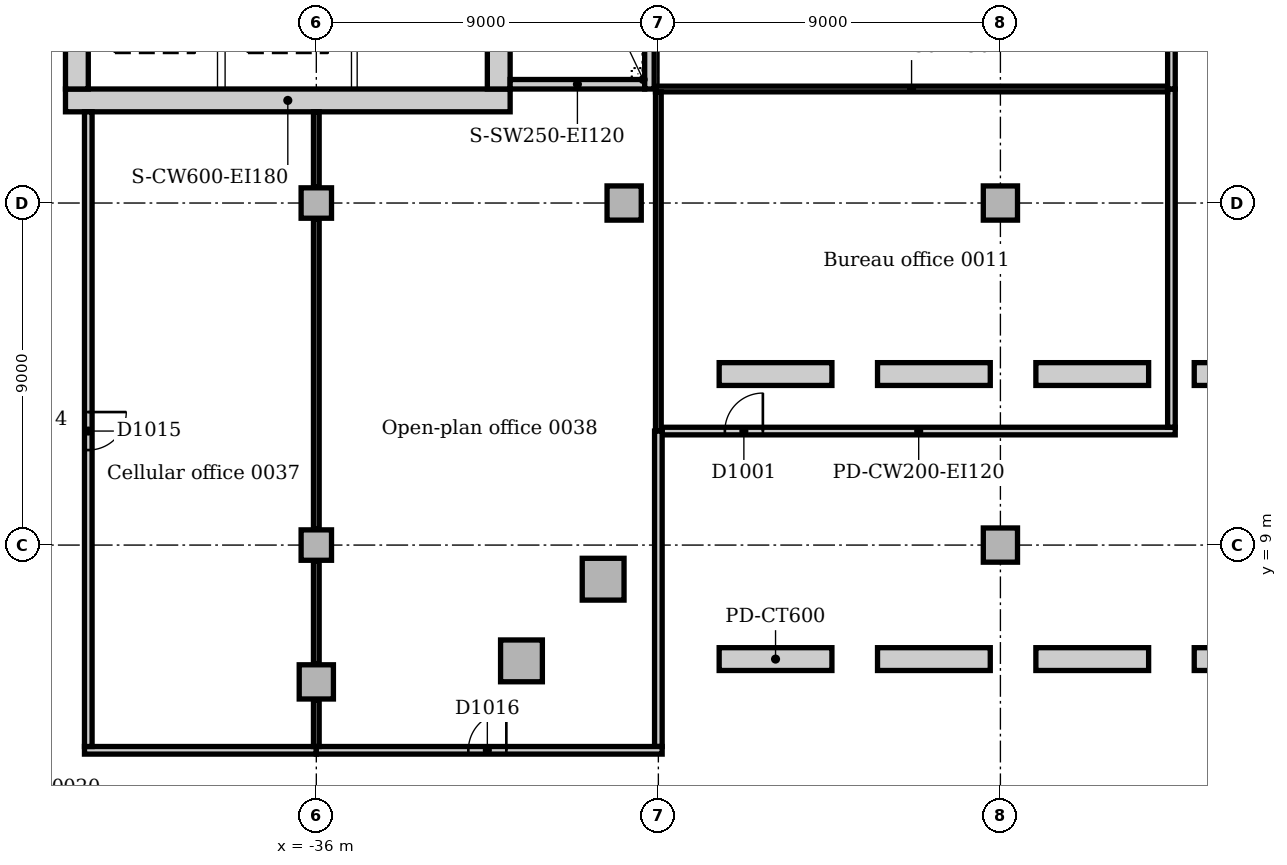
"""IFC4 building model, lengths in metres.
Left out: names, types, materials, properties, quantities, classifications, styles, units other than length and angle.
Written with IfcOpenShell. Run it as: python <this file> out.ifc"""

import sys

from ifc_helpers import new_model, si_unit, direction, frame, frame_2d, origin, origin_2d, place, context, subcontext, project, spatial, rectangle, extrude, element, fill, save


model = new_model("IFC4")
c1 = context("Model", 3, precision=1e-05, world=origin(), true_north=direction((0.0, 1.0)))
c2 = subcontext(c1, "Body", "Model", "MODEL_VIEW")
j1 = project(units=[si_unit("LENGTHUNIT", "METRE"), si_unit("PLANEANGLEUNIT", "RADIAN")], contexts=[c1])
p1 = place(None, origin())
s1 = spatial("IfcSite", under=j1, at=p1, CompositionType="ELEMENT")
p2 = place(p1, origin())
s2 = spatial("IfcBuilding", under=s1, at=p2, CompositionType="ELEMENT")
p3 = place(p2, origin())
s3 = spatial("IfcBuildingStorey", under=s2, at=p3, CompositionType="ELEMENT", Elevation=0.0)
p4 = place(p3, frame((-42.6, 20.7, 0.0), z_axis=(0.0, 0.0, 1.0), x_axis=(1.0, 0.0, 0.0)))
e1 = element("IfcWall", 1, at=p4, inside=s3, PredefinedType="SOLIDWALL", context=c2, shape_type="SweptSolid", body=[
    extrude(rectangle(XDim=11.7, YDim=0.6, at=frame_2d((5.85, 0.0))), origin(), (0.0, 0.0, 1.0), 6.0),
])
p5 = place(p3, frame((-31.2, 21.0, 0.0), z_axis=(0.0, 0.0, 1.0), x_axis=(0.0, 1.0, 0.0)))
e2 = element("IfcWall", 2, at=p5, inside=s3, PredefinedType="SOLIDWALL", context=c2, shape_type="SweptSolid", body=[
    extrude(rectangle(XDim=9.5, YDim=0.6, at=frame_2d((4.75, 0.0))), origin(), (0.0, 0.0, 1.0), 6.0),
])
p6 = place(p5, frame((5.25, 0.0, 0.0)))
e3 = element("IfcOpeningElement", 3, at=p6, cuts=e2, PredefinedType="OPENING", context=c2, shape_type="SweptSolid", body=[
    extrude(rectangle(XDim=1.0, YDim=2.1, at=frame_2d((0.5, 1.05))), frame((0.0, 0.31, 0.0), z_axis=(0.0, -1.0, 0.0), x_axis=(1.0, 0.0, 0.0)), (0.0, 0.0, 1.0), 0.62),
])
p7 = place(p3, frame((-42.3, 30.5, 0.0), z_axis=(0.0, 0.0, 1.0), x_axis=(0.0, -1.0, 0.0)))
e4 = element("IfcWall", 4, at=p7, inside=s3, PredefinedType="SOLIDWALL", context=c2, shape_type="SweptSolid", body=[
    extrude(rectangle(XDim=9.5, YDim=0.6, at=frame_2d((4.75, 0.0))), origin(), (0.0, 0.0, 1.0), 6.0),
])
p8 = place(p7, frame((3.85, 0.0, 0.0)))
e5 = element("IfcOpeningElement", 5, at=p8, cuts=e4, PredefinedType="OPENING", context=c2, shape_type="SweptSolid", body=[
    extrude(rectangle(XDim=1.8, YDim=2.1, at=frame_2d((0.9, 1.05))), frame((0.0, 0.31, 0.0), z_axis=(0.0, -1.0, 0.0), x_axis=(1.0, 0.0, 0.0)), (0.0, 0.0, 1.0), 0.62),
])
p9 = place(p3, frame((-30.9, 21.125, 0.0), z_axis=(0.0, 0.0, 1.0), x_axis=(1.0, 0.0, 0.0)))
e6 = element("IfcWall", 6, at=p9, inside=s3, PredefinedType="SOLIDWALL", context=c2, shape_type="SweptSolid", body=[
    extrude(rectangle(XDim=3.54, YDim=0.25, at=frame_2d((1.77, 0.0))), origin(), (0.0, 0.0, 1.0), 6.0),
])
p10 = place(p3, frame((-27.235, 21.0, 0.0), z_axis=(0.0, 0.0, 1.0), x_axis=(0.0, 1.0, 0.0)))
e7 = element("IfcWall", 7, at=p10, inside=s3, PredefinedType="SOLIDWALL", context=c2, shape_type="SweptSolid", body=[
    extrude(rectangle(XDim=6.65, YDim=0.25, at=frame_2d((3.325, 0.0))), origin(), (0.0, 0.0, 1.0), 6.0),
])
for number, where, z_axis, x_axis in (
    (8, (-30.602, 5.953, 0.0), (0.0, 0.0, 1.0), (1.0, 0.0, 0.0)),
    (9, (-28.453, 8.102, 0.0), (0.0, 0.0, 1.0), (1.0, 0.0, 0.0)),
):
    element("IfcColumn", number, at=place(p3, frame(where, z_axis=z_axis, x_axis=x_axis)), inside=s3, PredefinedType="COLUMN", context=c2, shape_type="SweptSolid", body=[
        extrude(rectangle(XDim=1.1, YDim=1.1, at=origin_2d()), origin(), (0.0, 0.0, 1.0), 5.7),
    ])
for number, where, z_axis, x_axis in (
    (10, (-36.0, 5.4, 0.0), (0.0, 0.0, 1.0), (1.0, 0.0, 0.0)),
    (11, (-27.9, 18.0, 0.0), (0.0, 0.0, 1.0), (1.0, 0.0, 0.0)),
):
    element("IfcColumn", number, at=place(p3, frame(where, z_axis=z_axis, x_axis=x_axis)), inside=s3, PredefinedType="COLUMN", context=c2, shape_type="SweptSolid", body=[
        extrude(rectangle(XDim=0.9, YDim=0.9, at=origin_2d()), origin(), (0.0, 0.0, 1.0), 5.7),
    ])
for number, where, z_axis, x_axis in (
    (12, (-36.0, 9.0, 0.0), (0.0, 0.0, 1.0), (1.0, 0.0, 0.0)),
    (13, (-36.0, 18.0, 0.0), (0.0, 0.0, 1.0), (1.0, 0.0, 0.0)),
):
    element("IfcColumn", number, at=place(p3, frame(where, z_axis=z_axis, x_axis=x_axis)), inside=s3, PredefinedType="COLUMN", context=c2, shape_type="SweptSolid", body=[
        extrude(rectangle(XDim=0.8, YDim=0.8, at=origin_2d()), origin(), (0.0, 0.0, 1.0), 5.7),
    ])
for number, where, z_axis, x_axis in (
    (14, (-18.0, 9.0, 0.0), (0.0, 0.0, 1.0), (1.0, 0.0, 0.0)),
    (15, (-18.0, 18.0, 0.0), (0.0, 0.0, 1.0), (1.0, 0.0, 0.0)),
):
    element("IfcColumn", number, at=place(p3, frame(where, z_axis=z_axis, x_axis=x_axis)), inside=s3, PredefinedType="COLUMN", context=c2, shape_type="SweptSolid", body=[
        extrude(rectangle(XDim=0.9, YDim=0.9, at=origin_2d()), origin(), (0.0, 0.0, 1.0), 5.7),
    ])
p11 = place(p3, frame((-26.9, 12.0, 0.0), z_axis=(0.0, 0.0, 1.0), x_axis=(1.0, 0.0, 0.0)))
e16 = element("IfcWall", 16, at=p11, inside=s3, PredefinedType="PARTITIONING", context=c2, shape_type="SweptSolid", body=[
    extrude(rectangle(XDim=13.5, YDim=0.2, at=frame_2d((6.75, 0.0))), origin(), (0.0, 0.0, 1.0), 5.7),
])
p12 = place(p11, frame((1.65, 0.0, 0.0)))
e17 = element("IfcOpeningElement", 17, at=p12, cuts=e16, PredefinedType="OPENING", context=c2, shape_type="SweptSolid", body=[
    extrude(rectangle(XDim=1.0, YDim=2.1, at=frame_2d((0.5, 1.05))), frame((0.0, 0.11, 0.0), z_axis=(0.0, -1.0, 0.0), x_axis=(1.0, 0.0, 0.0)), (0.0, 0.0, 1.0), 0.22),
])
p13 = place(p3, frame((-13.5, 12.1, 0.0), z_axis=(0.0, 0.0, 1.0), x_axis=(0.0, 1.0, 0.0)))
e18 = element("IfcWall", 18, at=p13, inside=s3, PredefinedType="PARTITIONING", context=c2, shape_type="SweptSolid", body=[
    extrude(rectangle(XDim=8.9, YDim=0.2, at=frame_2d((4.45, 0.0))), origin(), (0.0, 0.0, 1.0), 5.7),
])
p14 = place(p3, frame((-27.075, 21.0, 0.0), z_axis=(0.0, 0.0, 1.0), x_axis=(1.0, 0.0, 0.0)))
e19 = element("IfcWall", 19, at=p14, inside=s3, PredefinedType="PARTITIONING", context=c2, shape_type="SweptSolid", body=[
    extrude(rectangle(XDim=13.475, YDim=0.15, at=frame_2d((6.737, 0.0))), origin(), (0.0, 0.0, 1.0), 5.7),
])
p15 = place(p3, frame((-27.0, 12.0, 0.0), z_axis=(0.0, 0.0, 1.0), x_axis=(0.0, 1.0, 0.0)))
e20 = element("IfcWall", 20, at=p15, inside=s3, PredefinedType="PARTITIONING", context=c2, shape_type="SweptSolid", body=[
    extrude(rectangle(XDim=8.925, YDim=0.15, at=frame_2d((4.463, 0.0))), origin(), (0.0, 0.0, 1.0), 5.7),
])
p16 = place(p3, frame((-27.0, 3.7, 0.0), z_axis=(0.0, 0.0, 1.0), x_axis=(0.0, 1.0, 0.0)))
e21 = element("IfcWall", 21, at=p16, inside=s3, PredefinedType="PARTITIONING", context=c2, shape_type="SweptSolid", body=[
    extrude(rectangle(XDim=8.3, YDim=0.2, at=frame_2d((4.15, 0.0))), origin(), (0.0, 0.0, 1.0), 5.7),
])
p17 = place(p3, frame((-13.5, 21.0, 0.0), z_axis=(0.0, 0.0, 1.0), x_axis=(0.0, 1.0, 0.0)))
e22 = element("IfcWall", 22, at=p17, inside=s3, PredefinedType="PARTITIONING", context=c2, shape_type="SweptSolid", body=[
    extrude(rectangle(XDim=10.0, YDim=0.2, at=frame_2d((5.0, 0.0))), origin(), (0.0, 0.0, 1.0), 5.7),
])
p18 = place(p17, frame((5.5, 0.0, 0.0)))
e23 = element("IfcOpeningElement", 23, at=p18, cuts=e22, PredefinedType="OPENING", context=c2, shape_type="SweptSolid", body=[
    extrude(rectangle(XDim=1.0, YDim=2.1, at=frame_2d((0.5, 1.05))), frame((0.0, 0.11, 0.0), z_axis=(0.0, -1.0, 0.0), x_axis=(1.0, 0.0, 0.0)), (0.0, 0.0, 1.0), 0.22),
])
p19 = place(p3, frame((-42.1, 3.6, 0.0), z_axis=(0.0, 0.0, 1.0), x_axis=(1.0, 0.0, 0.0)))
e24 = element("IfcWall", 24, at=p19, inside=s3, PredefinedType="PARTITIONING", context=c2, shape_type="SweptSolid", body=[
    extrude(rectangle(XDim=6.1, YDim=0.2, at=frame_2d((3.05, 0.0))), origin(), (0.0, 0.0, 1.0), 5.7),
])
p20 = place(p3, frame((-36.0, 3.6, 0.0), z_axis=(0.0, 0.0, 1.0), x_axis=(1.0, 0.0, 0.0)))
e25 = element("IfcWall", 25, at=p20, inside=s3, PredefinedType="PARTITIONING", context=c2, shape_type="SweptSolid", body=[
    extrude(rectangle(XDim=9.1, YDim=0.2, at=frame_2d((4.55, 0.0))), origin(), (0.0, 0.0, 1.0), 5.7),
])
p21 = place(p20, frame((4.0, 0.0, 0.0)))
e26 = element("IfcOpeningElement", 26, at=p21, cuts=e25, PredefinedType="OPENING", context=c2, shape_type="SweptSolid", body=[
    extrude(rectangle(XDim=1.0, YDim=2.1, at=frame_2d((0.5, 1.05))), frame((0.0, 0.11, 0.0), z_axis=(0.0, -1.0, 0.0), x_axis=(1.0, 0.0, 0.0)), (0.0, 0.0, 1.0), 0.22),
])
p22 = place(p3, frame((-42.0, 3.7, 0.0), z_axis=(0.0, 0.0, 1.0), x_axis=(0.0, 1.0, 0.0)))
e27 = element("IfcWall", 27, at=p22, inside=s3, PredefinedType="PARTITIONING", context=c2, shape_type="SweptSolid", body=[
    extrude(rectangle(XDim=16.7, YDim=0.2, at=frame_2d((8.35, 0.0))), origin(), (0.0, 0.0, 1.0), 5.7),
])
p23 = place(p22, frame((7.8, 0.0, 0.0)))
e28 = element("IfcOpeningElement", 28, at=p23, cuts=e27, PredefinedType="OPENING", context=c2, shape_type="SweptSolid", body=[
    extrude(rectangle(XDim=1.0, YDim=2.1, at=frame_2d((0.5, 1.05))), frame((0.0, 0.11, 0.0), z_axis=(0.0, -1.0, 0.0), x_axis=(1.0, 0.0, 0.0)), (0.0, 0.0, 1.0), 0.22),
])
p24 = place(p3, frame((-36.0, 3.7, 0.0), z_axis=(0.0, 0.0, 1.0), x_axis=(0.0, 1.0, 0.0)))
e29 = element("IfcWall", 29, at=p24, inside=s3, PredefinedType="PARTITIONING", context=c2, shape_type="SweptSolid", body=[
    extrude(rectangle(XDim=1.23, YDim=0.15, at=frame_2d((0.615, 0.0))), origin(), (0.0, 0.0, 1.0), 5.7),
])
p25 = place(p3, frame((-36.0, 5.87, 0.0), z_axis=(0.0, 0.0, 1.0), x_axis=(0.0, 1.0, 0.0)))
e30 = element("IfcWall", 30, at=p25, inside=s3, PredefinedType="PARTITIONING", context=c2, shape_type="SweptSolid", body=[
    extrude(rectangle(XDim=2.71, YDim=0.15, at=frame_2d((1.355, 0.0))), origin(), (0.0, 0.0, 1.0), 5.7),
])
p26 = place(p3, frame((-36.0, 9.42, 0.0), z_axis=(0.0, 0.0, 1.0), x_axis=(0.0, 1.0, 0.0)))
e31 = element("IfcWall", 31, at=p26, inside=s3, PredefinedType="PARTITIONING", context=c2, shape_type="SweptSolid", body=[
    extrude(rectangle(XDim=8.16, YDim=0.15, at=frame_2d((4.08, 0.0))), origin(), (0.0, 0.0, 1.0), 5.7),
])
p27 = place(p3, frame((-36.0, 18.42, 0.0), z_axis=(0.0, 0.0, 1.0), x_axis=(0.0, 1.0, 0.0)))
e32 = element("IfcWall", 32, at=p27, inside=s3, PredefinedType="PARTITIONING", context=c2, shape_type="SweptSolid", body=[
    extrude(rectangle(XDim=1.98, YDim=0.15, at=frame_2d((0.99, 0.0))), origin(), (0.0, 0.0, 1.0), 5.7),
])
p28 = place(p3, frame((-25.4, 6.0, 0.0), z_axis=(0.0, 0.0, 1.0), x_axis=(1.0, 0.0, 0.0)))
e33 = element("IfcWall", 33, at=p28, inside=s3, PredefinedType="MOVABLE", context=c2, shape_type="SweptSolid", body=[
    extrude(rectangle(XDim=2.967, YDim=0.6, at=frame_2d((1.483, 0.0))), origin(), (0.0, 0.0, 1.0), 1.1),
])
p29 = place(p3, frame((-21.233, 6.0, 0.0), z_axis=(0.0, 0.0, 1.0), x_axis=(1.0, 0.0, 0.0)))
e34 = element("IfcWall", 34, at=p29, inside=s3, PredefinedType="MOVABLE", context=c2, shape_type="SweptSolid", body=[
    extrude(rectangle(XDim=2.967, YDim=0.6, at=frame_2d((1.483, 0.0))), origin(), (0.0, 0.0, 1.0), 1.1),
])
for number, where, z_axis, x_axis in (
    (35, (-17.067, 6.0, 0.0), (0.0, 0.0, 1.0), (1.0, 0.0, 0.0)),
    (36, (-12.9, 6.0, 0.0), (0.0, 0.0, 1.0), (1.0, 0.0, 0.0)),
    (37, (-25.4, 13.5, 0.0), (0.0, 0.0, 1.0), (1.0, 0.0, 0.0)),
):
    element("IfcWall", number, at=place(p3, frame(where, z_axis=z_axis, x_axis=x_axis)), inside=s3, PredefinedType="MOVABLE", context=c2, shape_type="SweptSolid", body=[
        extrude(rectangle(XDim=2.967, YDim=0.6, at=frame_2d((1.483, 0.0))), origin(), (0.0, 0.0, 1.0), 1.1),
    ])
p30 = place(p3, frame((-21.233, 13.5, 0.0), z_axis=(0.0, 0.0, 1.0), x_axis=(1.0, 0.0, 0.0)))
e38 = element("IfcWall", 38, at=p30, inside=s3, PredefinedType="MOVABLE", context=c2, shape_type="SweptSolid", body=[
    extrude(rectangle(XDim=2.967, YDim=0.6, at=frame_2d((1.483, 0.0))), origin(), (0.0, 0.0, 1.0), 1.1),
])
for number, where, z_axis, x_axis in (
    (39, (-17.067, 13.5, 0.0), (0.0, 0.0, 1.0), (1.0, 0.0, 0.0)),
    (40, (-12.9, 13.5, 0.0), (0.0, 0.0, 1.0), (1.0, 0.0, 0.0)),
):
    element("IfcWall", number, at=place(p3, frame(where, z_axis=z_axis, x_axis=x_axis)), inside=s3, PredefinedType="MOVABLE", context=c2, shape_type="SweptSolid", body=[
        extrude(rectangle(XDim=2.967, YDim=0.6, at=frame_2d((1.483, 0.0))), origin(), (0.0, 0.0, 1.0), 1.1),
    ])
p31 = place(p3, frame((-38.5, 21.0, 0.0), z_axis=(0.0, 0.0, 1.0), x_axis=(0.0, 1.0, 0.0)))
e41 = element("IfcWall", 41, at=p31, inside=s3, PredefinedType="SOLIDWALL", context=c2, shape_type="SweptSolid", body=[
    extrude(rectangle(XDim=3.1, YDim=0.2, at=frame_2d((1.55, 0.0))), origin(), (0.0, 0.0, 1.0), 6.0),
])
p32 = place(p3, frame((-35.0, 21.0, 0.0), z_axis=(0.0, 0.0, 1.0), x_axis=(0.0, 1.0, 0.0)))
e42 = element("IfcWall", 42, at=p32, inside=s3, PredefinedType="SOLIDWALL", context=c2, shape_type="SweptSolid", body=[
    extrude(rectangle(XDim=2.9, YDim=0.15, at=frame_2d((1.45, 0.0))), origin(), (0.0, 0.0, 1.0), 6.0),
])
p33 = place(p12, origin())
e43 = element("IfcDoor", 43, at=p33, inside=s3, OperationType="SINGLE_SWING_RIGHT", PredefinedType="DOOR", context=c2, shape_type="SweptSolid", body=[
    extrude(rectangle(XDim=1.0, YDim=2.1, at=frame_2d((0.5, 1.05))), frame((0.0, 0.025, 0.0), z_axis=(0.0, -1.0, 0.0), x_axis=(1.0, 0.0, 0.0)), (0.0, 0.0, 1.0), 0.05),
])
fill(e17, e43)
p34 = place(p23, frame((1.0, 0.0, 0.0), z_axis=(0.0, 0.0, 1.0), x_axis=(-1.0, 0.0, 0.0)))
e44 = element("IfcDoor", 44, at=p34, inside=s3, OperationType="SINGLE_SWING_LEFT", PredefinedType="DOOR", context=c2, shape_type="SweptSolid", body=[
    extrude(rectangle(XDim=1.0, YDim=2.1, at=frame_2d((0.5, 1.05))), frame((0.0, 0.025, 0.0), z_axis=(0.0, -1.0, 0.0), x_axis=(1.0, 0.0, 0.0)), (0.0, 0.0, 1.0), 0.05),
])
fill(e28, e44)
p35 = place(p21, origin())
e45 = element("IfcDoor", 45, at=p35, inside=s3, OperationType="SINGLE_SWING_RIGHT", PredefinedType="DOOR", context=c2, shape_type="SweptSolid", body=[
    extrude(rectangle(XDim=1.0, YDim=2.1, at=frame_2d((0.5, 1.05))), frame((0.0, 0.025, 0.0), z_axis=(0.0, -1.0, 0.0), x_axis=(1.0, 0.0, 0.0)), (0.0, 0.0, 1.0), 0.05),
])
fill(e26, e45)
save(model, sys.argv[1])
